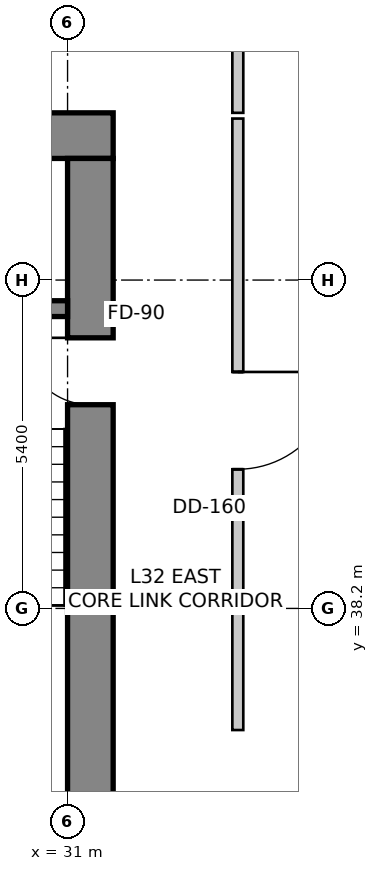
"""IFC4 building model, lengths in metres.
Left out: names, types, materials, properties, quantities, classifications, styles, units other than length and angle.
Written with IfcOpenShell. Run it as: python <this file> out.ifc"""

import sys

from ifc_helpers import new_model, si_unit, direction, frame, frame_2d, origin, place, context, subcontext, project, spatial, rectangle, extrude, source, transform, mapped, element, fill, save


model = new_model("IFC4")
c1 = context("Model", 3, precision=1e-05, world=origin(), true_north=direction((0.0, 1.0)))
c2 = subcontext(c1, "Body", "Model", "MODEL_VIEW")
j1 = project(units=[si_unit("LENGTHUNIT", "METRE"), si_unit("PLANEANGLEUNIT", "RADIAN")], contexts=[c1])
p1 = place(None, origin())
s1 = spatial("IfcSite", under=j1, at=p1, CompositionType="ELEMENT")
p2 = place(p1, origin())
s2 = spatial("IfcBuilding", under=s1, at=p2, CompositionType="ELEMENT")
p3 = place(p2, frame((0.0, 0.0, 132.2)))
s3 = spatial("IfcBuildingStorey", under=s2, at=p3, CompositionType="ELEMENT", Elevation=132.2)
p4 = place(p3, frame((15.85, 45.975, 0.0), z_axis=(0.0, 0.0, 1.0), x_axis=(1.0, 0.0, 0.0)))
e1 = element("IfcWall", 1, at=p4, inside=s3, PredefinedType="SHEAR", context=c2, shape_type="SweptSolid", body=[
    extrude(rectangle(XDim=15.9, YDim=0.75, at=frame_2d((7.95, 0.0))), origin(), (0.0, 0.0, 1.0), 3.6),
])
p5 = place(p3, frame((31.375, 34.2, 0.0), z_axis=(0.0, 0.0, 1.0), x_axis=(0.0, 1.0, 0.0)))
e2 = element("IfcWall", 2, at=p5, inside=s3, PredefinedType="SHEAR", context=c2, shape_type="SweptSolid", body=[
    extrude(rectangle(XDim=11.4, YDim=0.75, at=frame_2d((5.7, 0.0))), origin(), (0.0, 0.0, 1.0), 3.6),
])
m1 = source(origin(), c2, "Body", "SweptSolid", [
    extrude(rectangle(XDim=1.1, YDim=2.15, at=frame_2d((0.55, 1.075))), frame((0.0, 0.385, 0.0), z_axis=(0.0, -1.0, 0.0), x_axis=(1.0, 0.0, 0.0)), (0.0, 0.0, 1.0), 0.77),
])
p6 = place(p5, frame((7.35, 0.0, 0.0)))
e3 = element("IfcOpeningElement", 3, at=p6, cuts=e2, PredefinedType="OPENING", context=c2, shape_type="MappedRepresentation", body=[
    mapped(m1, transform((0.0, 0.0, 0.0), scale=1.0)),
])
p7 = place(p3, frame((27.5, 43.13, 0.0), z_axis=(0.0, 0.0, 1.0), x_axis=(1.0, 0.0, 0.0)))
e4 = element("IfcWall", 4, at=p7, inside=s3, PredefinedType="SHEAR", context=c2, shape_type="SweptSolid", body=[
    extrude(rectangle(XDim=3.5, YDim=0.26, at=frame_2d((1.75, 0.0))), origin(), (0.0, 0.0, 1.0), 3.6),
])
p8 = place(p3, frame((53.561, 47.48, 0.0), z_axis=(0.0, 0.0, 1.0), x_axis=(-0.985845173895, 0.167658262868, 0.0)))
e5 = element("IfcWall", 5, at=p8, inside=s3, PredefinedType="SOLIDWALL", context=c2, shape_type="SweptSolid", body=[
    extrude(rectangle(XDim=32.132, YDim=0.3, at=frame_2d((16.066, 0.0))), origin(), (0.0, 0.0, 1.0), 3.35),
])
m2 = source(origin(), c2, "Body", "SweptSolid", [
    extrude(rectangle(XDim=2.4, YDim=2.2, at=frame_2d((1.2, 1.1))), frame((0.0, 0.16, 0.0), z_axis=(0.0, -1.0, 0.0), x_axis=(1.0, 0.0, 0.0)), (0.0, 0.0, 1.0), 0.32),
])
p9 = place(p8, frame((2.404, 0.0, 0.85)))
e6 = element("IfcOpeningElement", 6, at=p9, cuts=e5, PredefinedType="OPENING", context=c2, shape_type="MappedRepresentation", body=[
    mapped(m2, transform((0.0, 0.0, 0.0), scale=1.0)),
])
p10 = place(p8, frame((8.708, 0.0, 0.85)))
e7 = element("IfcOpeningElement", 7, at=p10, cuts=e5, PredefinedType="OPENING", context=c2, shape_type="MappedRepresentation", body=[
    mapped(m2, transform((0.0, 0.0, 0.0), scale=1.0)),
])
m3 = source(origin(), c2, "Body", "SweptSolid", [
    extrude(rectangle(XDim=2.1, YDim=2.0, at=frame_2d((1.05, 1.0))), frame((0.0, 0.16, 0.0), z_axis=(0.0, -1.0, 0.0), x_axis=(1.0, 0.0, 0.0)), (0.0, 0.0, 1.0), 0.32),
])
p11 = place(p8, frame((14.019, 0.0, 0.85)))
e8 = element("IfcOpeningElement", 8, at=p11, cuts=e5, PredefinedType="OPENING", context=c2, shape_type="MappedRepresentation", body=[
    mapped(m3, transform((0.0, 0.0, 0.0), scale=1.0)),
])
p12 = place(p8, frame((19.03, 0.0, 0.85)))
e9 = element("IfcOpeningElement", 9, at=p12, cuts=e5, PredefinedType="OPENING", context=c2, shape_type="MappedRepresentation", body=[
    mapped(m2, transform((0.0, 0.0, 0.0), scale=1.0)),
])
p13 = place(p8, frame((25.4, 0.0, 0.85)))
e10 = element("IfcOpeningElement", 10, at=p13, cuts=e5, PredefinedType="OPENING", context=c2, shape_type="MappedRepresentation", body=[
    mapped(m2, transform((0.0, 0.0, 0.0), scale=1.0)),
])
m4 = source(origin(), c2, "Body", "SweptSolid", [
    extrude(rectangle(XDim=1.2, YDim=1.6, at=frame_2d((0.6, 0.8))), frame((0.0, 0.16, 0.0), z_axis=(0.0, -1.0, 0.0), x_axis=(1.0, 0.0, 0.0)), (0.0, 0.0, 1.0), 0.32),
])
p14 = place(p8, frame((30.5, 0.0, 0.85)))
e11 = element("IfcOpeningElement", 11, at=p14, cuts=e5, PredefinedType="OPENING", context=c2, shape_type="MappedRepresentation", body=[
    mapped(m4, transform((0.0, 0.0, 0.0), scale=1.0)),
])
p15 = place(p3, frame((33.8, 48.5, 0.0), z_axis=(0.0, 0.0, 1.0), x_axis=(0.0, -1.0, 0.0)))
e12 = element("IfcWall", 12, at=p15, inside=s3, PredefinedType="PARTITIONING", context=c2, shape_type="SweptSolid", body=[
    extrude(rectangle(XDim=2.15, YDim=0.18, at=frame_2d((1.075, 0.0))), origin(), (0.0, 0.0, 1.0), 2.492),
])
p16 = place(p3, frame((33.8, 46.256, 0.0), z_axis=(0.0, 0.0, 1.0), x_axis=(0.0, -1.0, 0.0)))
e13 = element("IfcWall", 13, at=p16, inside=s3, PredefinedType="PARTITIONING", context=c2, shape_type="SweptSolid", body=[
    extrude(rectangle(XDim=10.056, YDim=0.18, at=frame_2d((5.028, 0.0))), origin(), (0.0, 0.0, 1.0), 2.922),
])
m5 = source(origin(), c2, "Body", "SweptSolid", [
    extrude(rectangle(XDim=1.6, YDim=2.15, at=frame_2d((0.8, 1.075))), frame((0.0, 0.1, 0.0), z_axis=(0.0, -1.0, 0.0), x_axis=(1.0, 0.0, 0.0)), (0.0, 0.0, 1.0), 0.2),
])
p17 = place(p16, frame((4.167, 0.0, 0.0)))
e14 = element("IfcOpeningElement", 14, at=p17, cuts=e13, PredefinedType="OPENING", context=c2, shape_type="MappedRepresentation", body=[
    mapped(m5, transform((0.0, 0.0, 0.0), scale=1.0)),
])
m6 = source(origin(), c2, "Body", "SweptSolid", [
    extrude(rectangle(XDim=1.1, YDim=2.15, at=frame_2d((0.55, 1.075))), frame((0.0, 0.025, 0.0), z_axis=(0.0, -1.0, 0.0), x_axis=(1.0, 0.0, 0.0)), (0.0, 0.0, 1.0), 0.05),
])
p18 = place(p6, origin())
e15 = element("IfcDoor", 15, at=p18, inside=s3, OperationType="SINGLE_SWING_RIGHT", PredefinedType="DOOR", context=c2, shape_type="MappedRepresentation", body=[
    mapped(m6, transform((0.0, 0.0, 0.0), scale=1.0)),
])
fill(e3, e15)
m7 = source(origin(), c2, "Body", "SweptSolid", [
    extrude(rectangle(XDim=1.6, YDim=2.15, at=frame_2d((0.8, 1.075))), frame((0.0, 0.025, 0.0), z_axis=(0.0, -1.0, 0.0), x_axis=(1.0, 0.0, 0.0)), (0.0, 0.0, 1.0), 0.05),
])
p19 = place(p17, origin())
e16 = element("IfcDoor", 16, at=p19, inside=s3, OperationType="SINGLE_SWING_LEFT", PredefinedType="DOOR", context=c2, shape_type="MappedRepresentation", body=[
    mapped(m7, transform((0.0, 0.0, 0.0), scale=1.0)),
])
fill(e14, e16)
save(model, sys.argv[1])
